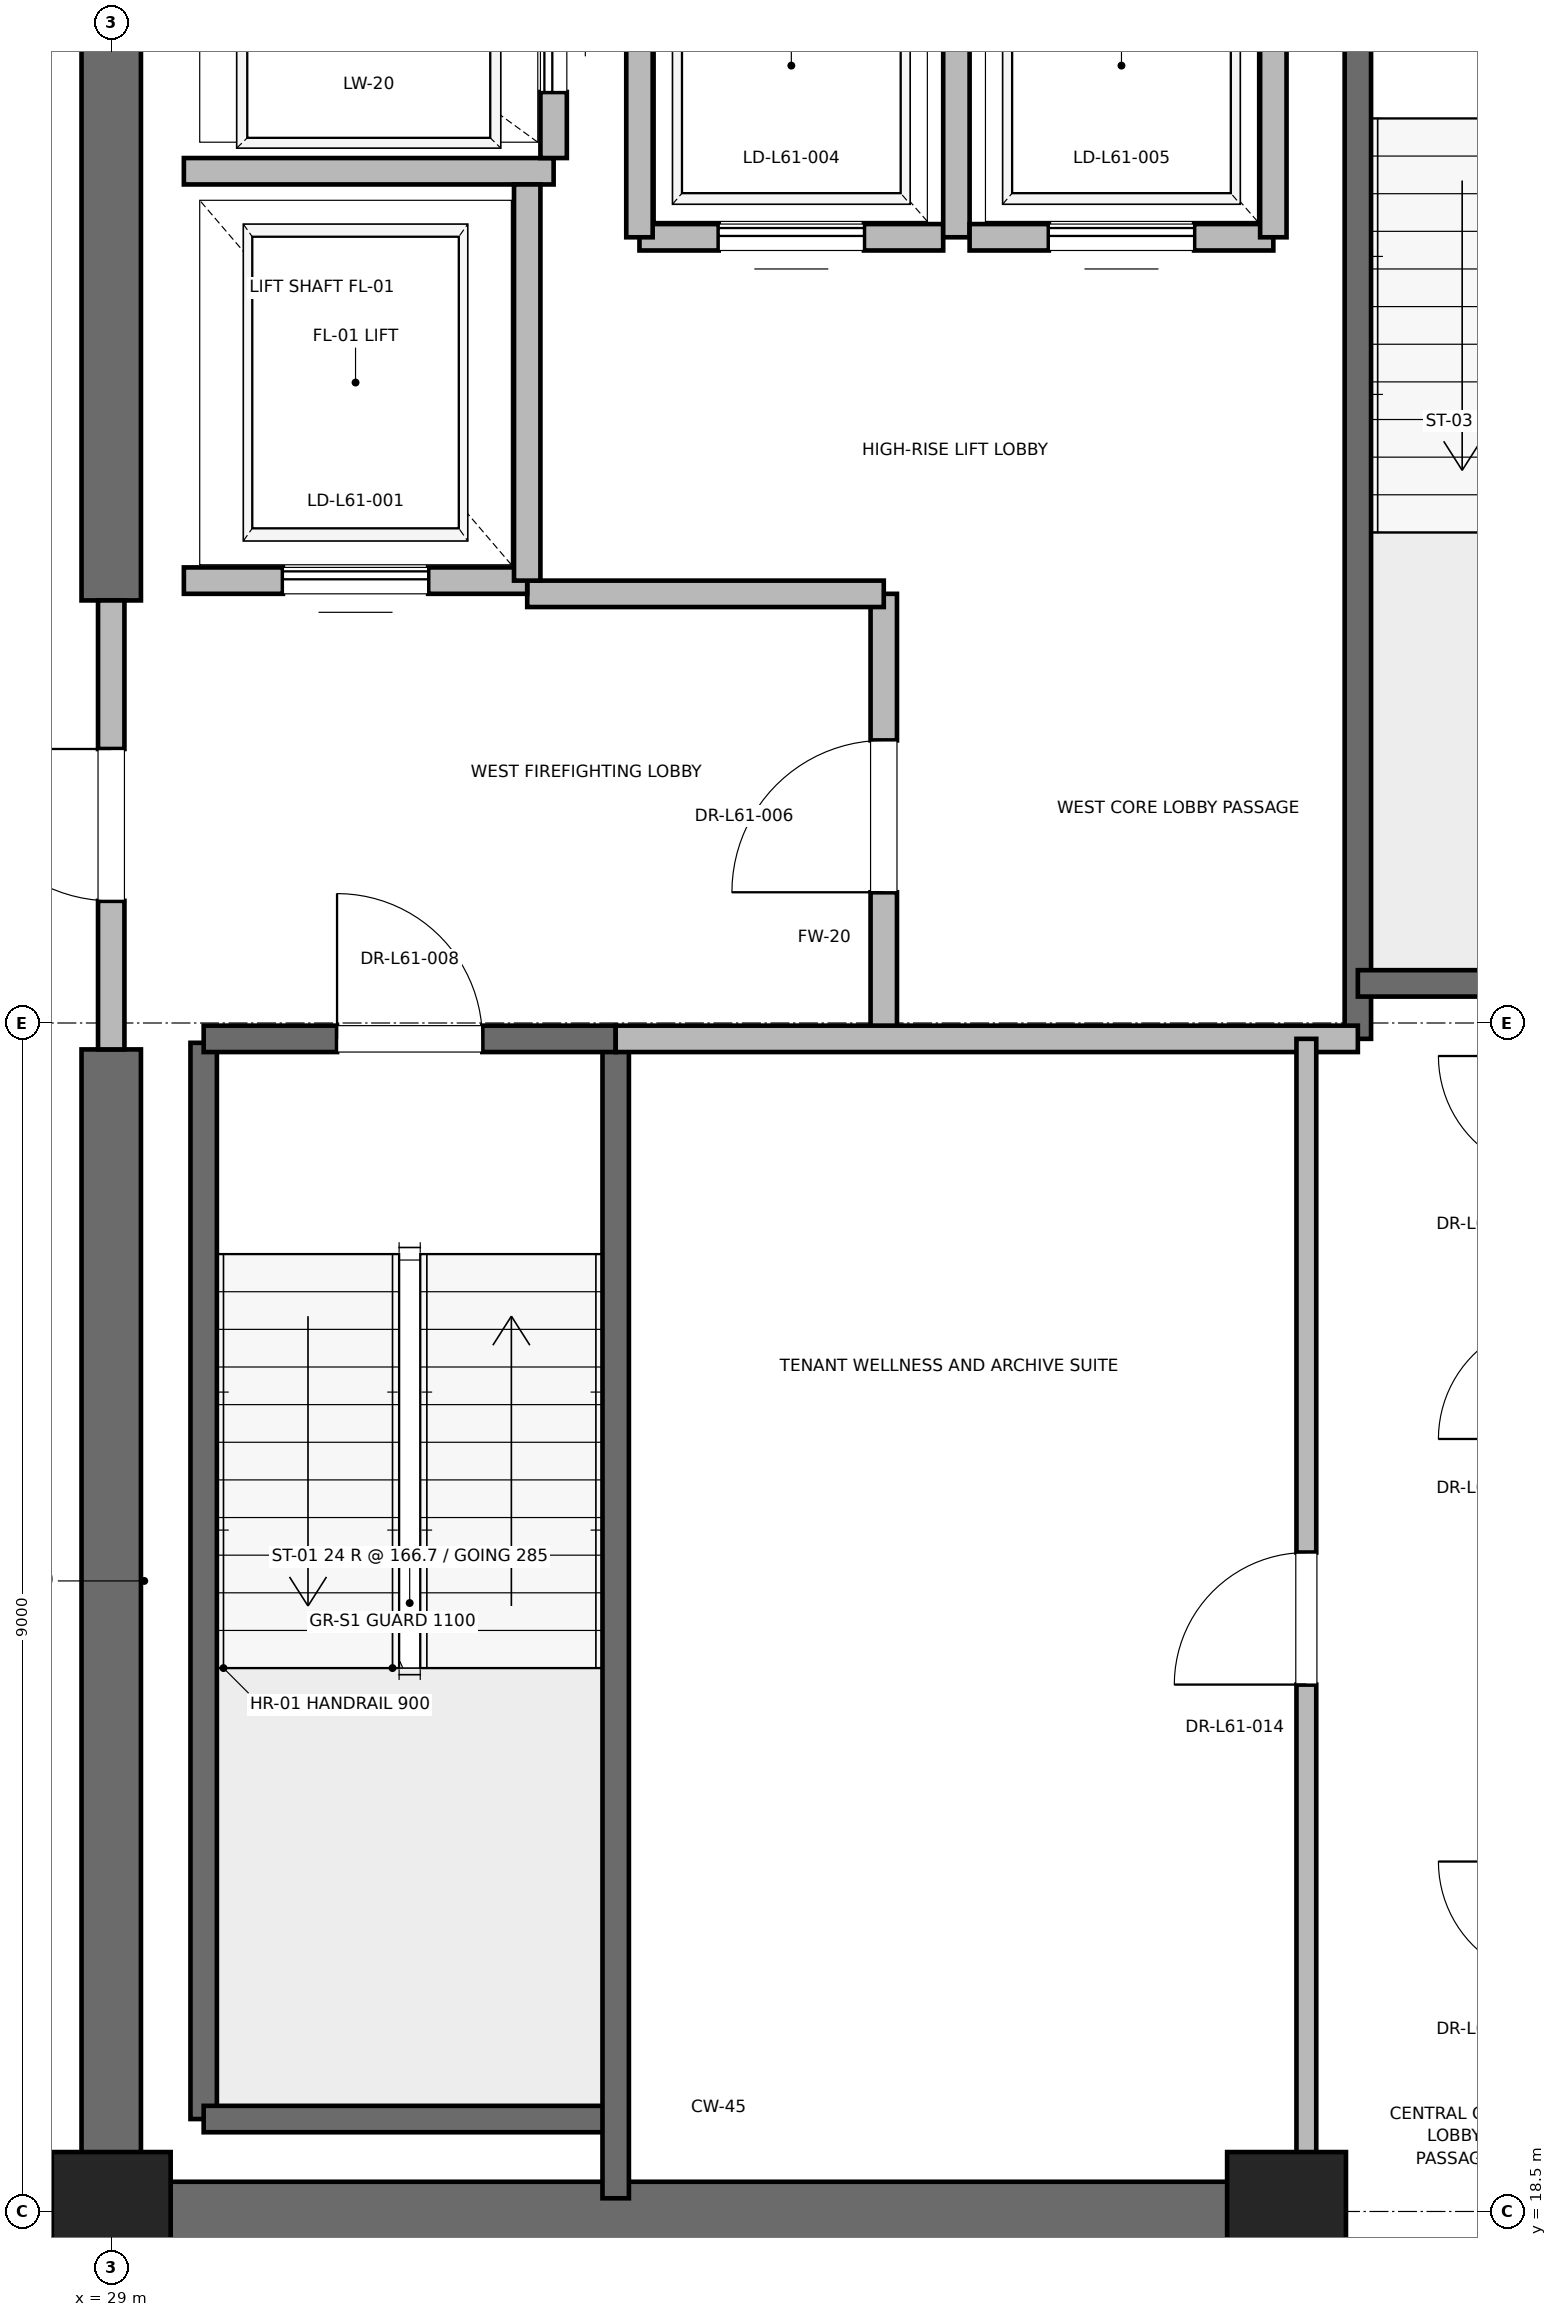
"""IFC4 building model, lengths in metres.
Left out: names, types, materials, properties, quantities, classifications, styles, units other than length and angle.
Written with IfcOpenShell. Run it as: python <this file> out.ifc"""

import sys

from ifc_helpers import new_model, si_unit, direction, frame, frame_2d, origin, origin_2d, place, context, subcontext, project, spatial, rectangle, extrude, element, fill, save


model = new_model("IFC4")
c1 = context("Model", 3, precision=1e-05, world=origin(), true_north=direction((0.0, 1.0)))
c2 = subcontext(c1, "Body", "Model", "MODEL_VIEW")
j1 = project(units=[si_unit("LENGTHUNIT", "METRE"), si_unit("PLANEANGLEUNIT", "RADIAN")], contexts=[c1])
p1 = place(None, origin())
s1 = spatial("IfcSite", under=j1, at=p1, CompositionType="ELEMENT")
p2 = place(p1, origin())
s2 = spatial("IfcBuilding", under=s1, at=p2, CompositionType="ELEMENT")
p3 = place(p2, frame((0.0, 0.0, 263.2)))
s3 = spatial("IfcBuildingStorey", under=s2, at=p3, CompositionType="ELEMENT", Elevation=263.2)
for number, where, z_axis, x_axis in (
    (1, (29.0, 18.5, 0.0), (0.0, 0.0, 1.0), (1.0, 0.0, 0.0)),
    (2, (37.9, 18.5, 0.0), (0.0, 0.0, 1.0), (1.0, 0.0, 0.0)),
):
    element("IfcColumn", number, at=place(p3, frame(where, z_axis=z_axis, x_axis=x_axis)), inside=s3, PredefinedType="PILASTER", context=c2, shape_type="SweptSolid", body=[
        extrude(rectangle(XDim=0.9, YDim=0.9, at=origin_2d()), origin(), (0.0, 0.0, 1.0), 4.0),
    ])
p4 = place(p3, frame((29.0, 18.5, 0.0), z_axis=(0.0, 0.0, 1.0), x_axis=(1.0, 0.0, 0.0)))
e3 = element("IfcWall", 3, at=p4, inside=s3, PredefinedType="SHEAR", context=c2, shape_type="SweptSolid", body=[
    extrude(rectangle(XDim=9.2, YDim=0.45, at=frame_2d((4.6, 0.0))), origin(), (0.0, 0.0, 1.0), 3.785),
])
p5 = place(p3, frame((29.0, 18.5, 0.0), z_axis=(0.0, 0.0, 1.0), x_axis=(0.0, 1.0, 0.0)))
e4 = element("IfcWall", 4, at=p5, inside=s3, PredefinedType="SHEAR", context=c2, shape_type="SweptSolid", body=[
    extrude(rectangle(XDim=8.8, YDim=0.45, at=frame_2d((4.4, 0.0))), origin(), (0.0, 0.0, 1.0), 3.785),
])
p6 = place(p3, frame((29.0, 30.7, 0.0), z_axis=(0.0, 0.0, 1.0), x_axis=(0.0, 1.0, 0.0)))
e5 = element("IfcWall", 5, at=p6, inside=s3, PredefinedType="SHEAR", context=c2, shape_type="SweptSolid", body=[
    extrude(rectangle(XDim=5.8, YDim=0.45, at=frame_2d((2.9, 0.0))), origin(), (0.0, 0.0, 1.0), 3.785),
])
p7 = place(p3, frame((29.7, 19.2, 0.0), z_axis=(0.0, 0.0, 1.0), x_axis=(0.0, 1.0, 0.0)))
e6 = element("IfcWall", 6, at=p7, inside=s3, PredefinedType="SOLIDWALL", context=c2, shape_type="SweptSolid", body=[
    extrude(rectangle(XDim=8.15, YDim=0.2, at=frame_2d((4.075, 0.0))), origin(), (0.0, 0.0, 1.0), 3.785),
])
p8 = place(p3, frame((29.7, 19.2, 0.0), z_axis=(0.0, 0.0, 1.0), x_axis=(1.0, 0.0, 0.0)))
e7 = element("IfcWall", 7, at=p8, inside=s3, PredefinedType="SOLIDWALL", context=c2, shape_type="SweptSolid", body=[
    extrude(rectangle(XDim=3.12, YDim=0.2, at=frame_2d((1.56, 0.0))), origin(), (0.0, 0.0, 1.0), 3.785),
])
p9 = place(p3, frame((32.82, 18.6, 0.0), z_axis=(0.0, 0.0, 1.0), x_axis=(0.0, 1.0, 0.0)))
e8 = element("IfcWall", 8, at=p9, inside=s3, PredefinedType="SOLIDWALL", context=c2, shape_type="SweptSolid", body=[
    extrude(rectangle(XDim=8.78, YDim=0.2, at=frame_2d((4.39, 0.0))), origin(), (0.0, 0.0, 1.0), 3.785),
])
p10 = place(p3, frame((29.7, 27.38, 0.0), z_axis=(0.0, 0.0, 1.0), x_axis=(1.0, 0.0, 0.0)))
e9 = element("IfcWall", 9, at=p10, inside=s3, PredefinedType="SOLIDWALL", context=c2, shape_type="SweptSolid", body=[
    extrude(rectangle(XDim=3.12, YDim=0.2, at=frame_2d((1.56, 0.0))), origin(), (0.0, 0.0, 1.0), 3.785),
])
p11 = place(p10, frame((1.01, 0.0, 0.0)))
e10 = element("IfcOpeningElement", 10, at=p11, cuts=e9, PredefinedType="OPENING", context=c2, shape_type="SweptSolid", body=[
    extrude(rectangle(XDim=1.1, YDim=2.15, at=frame_2d((0.55, 1.075))), frame((0.0, 0.1, 0.0), z_axis=(0.0, -1.0, 0.0), x_axis=(1.0, 0.0, 0.0)), (0.0, 0.0, 1.0), 0.2),
])
p12 = place(p3, frame((38.44, 27.38, 0.0), z_axis=(0.0, 0.0, 1.0), x_axis=(0.0, 1.0, 0.0)))
e11 = element("IfcWall", 11, at=p12, inside=s3, PredefinedType="SOLIDWALL", context=c2, shape_type="SweptSolid", body=[
    extrude(rectangle(XDim=8.87, YDim=0.2, at=frame_2d((4.435, 0.0))), origin(), (0.0, 0.0, 1.0), 3.785),
])
p13 = place(p3, frame((38.44, 27.8, 0.0), z_axis=(0.0, 0.0, 1.0), x_axis=(1.0, 0.0, 0.0)))
e12 = element("IfcWall", 12, at=p13, inside=s3, PredefinedType="SOLIDWALL", context=c2, shape_type="SweptSolid", body=[
    extrude(rectangle(XDim=3.32, YDim=0.2, at=frame_2d((1.66, 0.0))), origin(), (0.0, 0.0, 1.0), 3.785),
])
p14 = place(p3, frame((34.85, 27.38, 0.0), z_axis=(0.0, 0.0, 1.0), x_axis=(0.0, 1.0, 0.0)))
e13 = element("IfcWall", 13, at=p14, inside=s3, PredefinedType="PARTITIONING", context=c2, shape_type="SweptSolid", body=[
    extrude(rectangle(XDim=3.37, YDim=0.2, at=frame_2d((1.685, 0.0))), origin(), (0.0, 0.0, 1.0), 3.785),
])
p15 = place(p14, frame((1.11, 0.0, 0.0)))
e14 = element("IfcOpeningElement", 14, at=p15, cuts=e13, PredefinedType="OPENING", context=c2, shape_type="SweptSolid", body=[
    extrude(rectangle(XDim=1.15, YDim=2.2, at=frame_2d((0.575, 1.1))), frame((0.0, 0.1, 0.0), z_axis=(0.0, -1.0, 0.0), x_axis=(1.0, 0.0, 0.0)), (0.0, 0.0, 1.0), 0.2),
])
p16 = place(p3, frame((29.0, 27.3, 0.0), z_axis=(0.0, 0.0, 1.0), x_axis=(0.0, 1.0, 0.0)))
e15 = element("IfcWall", 15, at=p16, inside=s3, PredefinedType="PARTITIONING", context=c2, shape_type="SweptSolid", body=[
    extrude(rectangle(XDim=3.4, YDim=0.2, at=frame_2d((1.7, 0.0))), origin(), (0.0, 0.0, 1.0), 2.865),
])
p17 = place(p16, frame((1.125, 0.0, 0.0)))
e16 = element("IfcOpeningElement", 16, at=p17, cuts=e15, PredefinedType="OPENING", context=c2, shape_type="SweptSolid", body=[
    extrude(rectangle(XDim=1.15, YDim=2.2, at=frame_2d((0.575, 1.1))), frame((0.0, 0.1, 0.0), z_axis=(0.0, -1.0, 0.0), x_axis=(1.0, 0.0, 0.0)), (0.0, 0.0, 1.0), 0.2),
])
p18 = place(p3, frame((32.82, 27.38, 0.0), z_axis=(0.0, 0.0, 1.0), x_axis=(1.0, 0.0, 0.0)))
e17 = element("IfcWall", 17, at=p18, inside=s3, PredefinedType="PARTITIONING", context=c2, shape_type="SweptSolid", body=[
    extrude(rectangle(XDim=5.62, YDim=0.2, at=frame_2d((2.81, 0.0))), origin(), (0.0, 0.0, 1.0), 3.785),
])
p19 = place(p3, frame((32.15, 30.75, 0.0), z_axis=(0.0, 0.0, 1.0), x_axis=(1.0, 0.0, 0.0)))
e18 = element("IfcWall", 18, at=p19, inside=s3, PredefinedType="PARTITIONING", context=c2, shape_type="SweptSolid", body=[
    extrude(rectangle(XDim=2.7, YDim=0.2, at=frame_2d((1.35, 0.0))), origin(), (0.0, 0.0, 1.0), 3.785),
])
p20 = place(p3, frame((29.55, 30.85, 0.0), z_axis=(0.0, 0.0, 1.0), x_axis=(1.0, 0.0, 0.0)))
e19 = element("IfcWall", 19, at=p20, inside=s3, PredefinedType="SOLIDWALL", context=c2, shape_type="SweptSolid", body=[
    extrude(rectangle(XDim=2.6, YDim=0.2, at=frame_2d((1.3, 0.0))), origin(), (0.0, 0.0, 1.0), 2.865),
])
p21 = place(p20, frame((0.75, 0.0, 0.0)))
e20 = element("IfcOpeningElement", 20, at=p21, cuts=e19, PredefinedType="OPENING", context=c2, shape_type="SweptSolid", body=[
    extrude(rectangle(XDim=1.1, YDim=2.2, at=frame_2d((0.55, 1.1))), frame((0.0, 0.1, 0.0), z_axis=(0.0, -1.0, 0.0), x_axis=(1.0, 0.0, 0.0)), (0.0, 0.0, 1.0), 0.2),
])
p22 = place(p3, frame((29.55, 33.95, 0.0), z_axis=(0.0, 0.0, 1.0), x_axis=(1.0, 0.0, 0.0)))
e21 = element("IfcWall", 21, at=p22, inside=s3, PredefinedType="SOLIDWALL", context=c2, shape_type="SweptSolid", body=[
    extrude(rectangle(XDim=2.8, YDim=0.2, at=frame_2d((1.4, 0.0))), origin(), (0.0, 0.0, 1.0), 3.785),
])
p23 = place(p3, frame((32.15, 30.85, 0.0), z_axis=(0.0, 0.0, 1.0), x_axis=(0.0, 1.0, 0.0)))
e22 = element("IfcWall", 22, at=p23, inside=s3, PredefinedType="SOLIDWALL", context=c2, shape_type="SweptSolid", body=[
    extrude(rectangle(XDim=3.0, YDim=0.2, at=frame_2d((1.5, 0.0))), origin(), (0.0, 0.0, 1.0), 3.785),
])
p24 = place(p3, frame((32.35, 34.05, 0.0), z_axis=(0.0, 0.0, 1.0), x_axis=(0.0, 1.0, 0.0)))
e23 = element("IfcWall", 23, at=p24, inside=s3, PredefinedType="SOLIDWALL", context=c2, shape_type="SweptSolid", body=[
    extrude(rectangle(XDim=2.1, YDim=0.2, at=frame_2d((1.05, 0.0))), origin(), (0.0, 0.0, 1.0), 3.785),
])
p25 = place(p24, frame((0.5, 0.0, 0.0)))
e24 = element("IfcOpeningElement", 24, at=p25, cuts=e23, PredefinedType="OPENING", context=c2, shape_type="SweptSolid", body=[
    extrude(rectangle(XDim=1.1, YDim=2.2, at=frame_2d((0.55, 1.1))), frame((0.0, 0.1, 0.0), z_axis=(0.0, -1.0, 0.0), x_axis=(1.0, 0.0, 0.0)), (0.0, 0.0, 1.0), 0.2),
])
p26 = place(p3, frame((33.0, 33.45, 0.0), z_axis=(0.0, 0.0, 1.0), x_axis=(1.0, 0.0, 0.0)))
e25 = element("IfcWall", 25, at=p26, inside=s3, PredefinedType="SOLIDWALL", context=c2, shape_type="SweptSolid", body=[
    extrude(rectangle(XDim=2.3, YDim=0.2, at=frame_2d((1.15, 0.0))), origin(), (0.0, 0.0, 1.0), 3.785),
])
p27 = place(p26, frame((0.6, 0.0, 0.0)))
e26 = element("IfcOpeningElement", 26, at=p27, cuts=e25, PredefinedType="OPENING", context=c2, shape_type="SweptSolid", body=[
    extrude(rectangle(XDim=1.1, YDim=2.2, at=frame_2d((0.55, 1.1))), frame((0.0, 0.1, 0.0), z_axis=(0.0, -1.0, 0.0), x_axis=(1.0, 0.0, 0.0)), (0.0, 0.0, 1.0), 0.2),
])
p28 = place(p3, frame((33.0, 36.05, 0.0), z_axis=(0.0, 0.0, 1.0), x_axis=(0.0, -1.0, 0.0)))
e27 = element("IfcWall", 27, at=p28, inside=s3, PredefinedType="SOLIDWALL", context=c2, shape_type="SweptSolid", body=[
    extrude(rectangle(XDim=2.6, YDim=0.2, at=frame_2d((1.3, 0.0))), origin(), (0.0, 0.0, 1.0), 3.785),
])
p29 = place(p3, frame((35.4, 33.45, 0.0), z_axis=(0.0, 0.0, 1.0), x_axis=(0.0, 1.0, 0.0)))
e28 = element("IfcWall", 28, at=p29, inside=s3, PredefinedType="SOLIDWALL", context=c2, shape_type="SweptSolid", body=[
    extrude(rectangle(XDim=2.6, YDim=0.2, at=frame_2d((1.3, 0.0))), origin(), (0.0, 0.0, 1.0), 2.865),
])
p30 = place(p3, frame((35.5, 33.45, 0.0), z_axis=(0.0, 0.0, 1.0), x_axis=(1.0, 0.0, 0.0)))
e29 = element("IfcWall", 29, at=p30, inside=s3, PredefinedType="SOLIDWALL", context=c2, shape_type="SweptSolid", body=[
    extrude(rectangle(XDim=2.3, YDim=0.2, at=frame_2d((1.15, 0.0))), origin(), (0.0, 0.0, 1.0), 3.785),
])
p31 = place(p30, frame((0.6, 0.0, 0.0)))
e30 = element("IfcOpeningElement", 30, at=p31, cuts=e29, PredefinedType="OPENING", context=c2, shape_type="SweptSolid", body=[
    extrude(rectangle(XDim=1.1, YDim=2.2, at=frame_2d((0.55, 1.1))), frame((0.0, 0.1, 0.0), z_axis=(0.0, -1.0, 0.0), x_axis=(1.0, 0.0, 0.0)), (0.0, 0.0, 1.0), 0.2),
])
p32 = place(p3, frame((37.8, 33.45, 0.0), z_axis=(0.0, 0.0, 1.0), x_axis=(0.0, 1.0, 0.0)))
e31 = element("IfcWall", 31, at=p32, inside=s3, PredefinedType="SOLIDWALL", context=c2, shape_type="SweptSolid", body=[
    extrude(rectangle(XDim=2.6, YDim=0.2, at=frame_2d((1.3, 0.0))), origin(), (0.0, 0.0, 1.0), 2.865),
])
p33 = place(p3, frame((38.05, 18.6, 0.0), z_axis=(0.0, 0.0, 1.0), x_axis=(0.0, 1.0, 0.0)))
e32 = element("IfcWall", 32, at=p33, inside=s3, PredefinedType="PARTITIONING", context=c2, shape_type="SweptSolid", body=[
    extrude(rectangle(XDim=8.78, YDim=0.15, at=frame_2d((4.39, 0.0))), origin(), (0.0, 0.0, 1.0), 2.85),
])
p34 = place(p33, frame((3.89, 0.0, 0.0)))
e33 = element("IfcOpeningElement", 33, at=p34, cuts=e32, PredefinedType="OPENING", context=c2, shape_type="SweptSolid", body=[
    extrude(rectangle(XDim=1.0, YDim=2.15, at=frame_2d((0.5, 1.075))), frame((0.0, 0.075, 0.0), z_axis=(0.0, -1.0, 0.0), x_axis=(1.0, 0.0, 0.0)), (0.0, 0.0, 1.0), 0.15),
])
p35 = place(p11, origin())
e34 = element("IfcDoor", 34, at=p35, inside=s3, OperationType="SINGLE_SWING_LEFT", PredefinedType="DOOR", context=c2, shape_type="SweptSolid", body=[
    extrude(rectangle(XDim=1.1, YDim=2.15, at=frame_2d((0.55, 1.075))), frame((0.0, 0.025, 0.0), z_axis=(0.0, -1.0, 0.0), x_axis=(1.0, 0.0, 0.0)), (0.0, 0.0, 1.0), 0.05),
])
fill(e10, e34)
p36 = place(p15, origin())
e35 = element("IfcDoor", 35, at=p36, inside=s3, OperationType="SINGLE_SWING_LEFT", PredefinedType="DOOR", context=c2, shape_type="SweptSolid", body=[
    extrude(rectangle(XDim=1.15, YDim=2.2, at=frame_2d((0.575, 1.1))), frame((0.0, 0.025, 0.0), z_axis=(0.0, -1.0, 0.0), x_axis=(1.0, 0.0, 0.0)), (0.0, 0.0, 1.0), 0.05),
])
fill(e14, e35)
p37 = place(p17, origin())
e36 = element("IfcDoor", 36, at=p37, inside=s3, OperationType="SINGLE_SWING_RIGHT", PredefinedType="DOOR", context=c2, shape_type="SweptSolid", body=[
    extrude(rectangle(XDim=1.15, YDim=2.2, at=frame_2d((0.575, 1.1))), frame((0.0, 0.025, 0.0), z_axis=(0.0, -1.0, 0.0), x_axis=(1.0, 0.0, 0.0)), (0.0, 0.0, 1.0), 0.05),
])
fill(e16, e36)
p38 = place(p21, origin())
e37 = element("IfcDoor", 37, at=p38, inside=s3, OperationType="SLIDING_TO_RIGHT", PredefinedType="DOOR", context=c2, shape_type="SweptSolid", body=[
    extrude(rectangle(XDim=1.1, YDim=2.2, at=frame_2d((0.55, 1.1))), frame((0.0, 0.025, 0.0), z_axis=(0.0, -1.0, 0.0), x_axis=(1.0, 0.0, 0.0)), (0.0, 0.0, 1.0), 0.05),
])
fill(e20, e37)
p39 = place(p25, origin())
e38 = element("IfcDoor", 38, at=p39, inside=s3, OperationType="SLIDING_TO_RIGHT", PredefinedType="DOOR", context=c2, shape_type="SweptSolid", body=[
    extrude(rectangle(XDim=1.1, YDim=2.2, at=frame_2d((0.55, 1.1))), frame((0.0, 0.025, 0.0), z_axis=(0.0, -1.0, 0.0), x_axis=(1.0, 0.0, 0.0)), (0.0, 0.0, 1.0), 0.05),
])
fill(e24, e38)
p40 = place(p27, origin())
e39 = element("IfcDoor", 39, at=p40, inside=s3, OperationType="SLIDING_TO_RIGHT", PredefinedType="DOOR", context=c2, shape_type="SweptSolid", body=[
    extrude(rectangle(XDim=1.1, YDim=2.2, at=frame_2d((0.55, 1.1))), frame((0.0, 0.025, 0.0), z_axis=(0.0, -1.0, 0.0), x_axis=(1.0, 0.0, 0.0)), (0.0, 0.0, 1.0), 0.05),
])
fill(e26, e39)
p41 = place(p31, origin())
e40 = element("IfcDoor", 40, at=p41, inside=s3, OperationType="SLIDING_TO_RIGHT", PredefinedType="DOOR", context=c2, shape_type="SweptSolid", body=[
    extrude(rectangle(XDim=1.1, YDim=2.2, at=frame_2d((0.55, 1.1))), frame((0.0, 0.025, 0.0), z_axis=(0.0, -1.0, 0.0), x_axis=(1.0, 0.0, 0.0)), (0.0, 0.0, 1.0), 0.05),
])
fill(e30, e40)
p42 = place(p34, origin())
e41 = element("IfcDoor", 41, at=p42, inside=s3, OperationType="SINGLE_SWING_LEFT", PredefinedType="DOOR", context=c2, shape_type="SweptSolid", body=[
    extrude(rectangle(XDim=1.0, YDim=2.15, at=frame_2d((0.5, 1.075))), frame((0.0, 0.025, 0.0), z_axis=(0.0, -1.0, 0.0), x_axis=(1.0, 0.0, 0.0)), (0.0, 0.0, 1.0), 0.05),
])
fill(e33, e41)
save(model, sys.argv[1])
